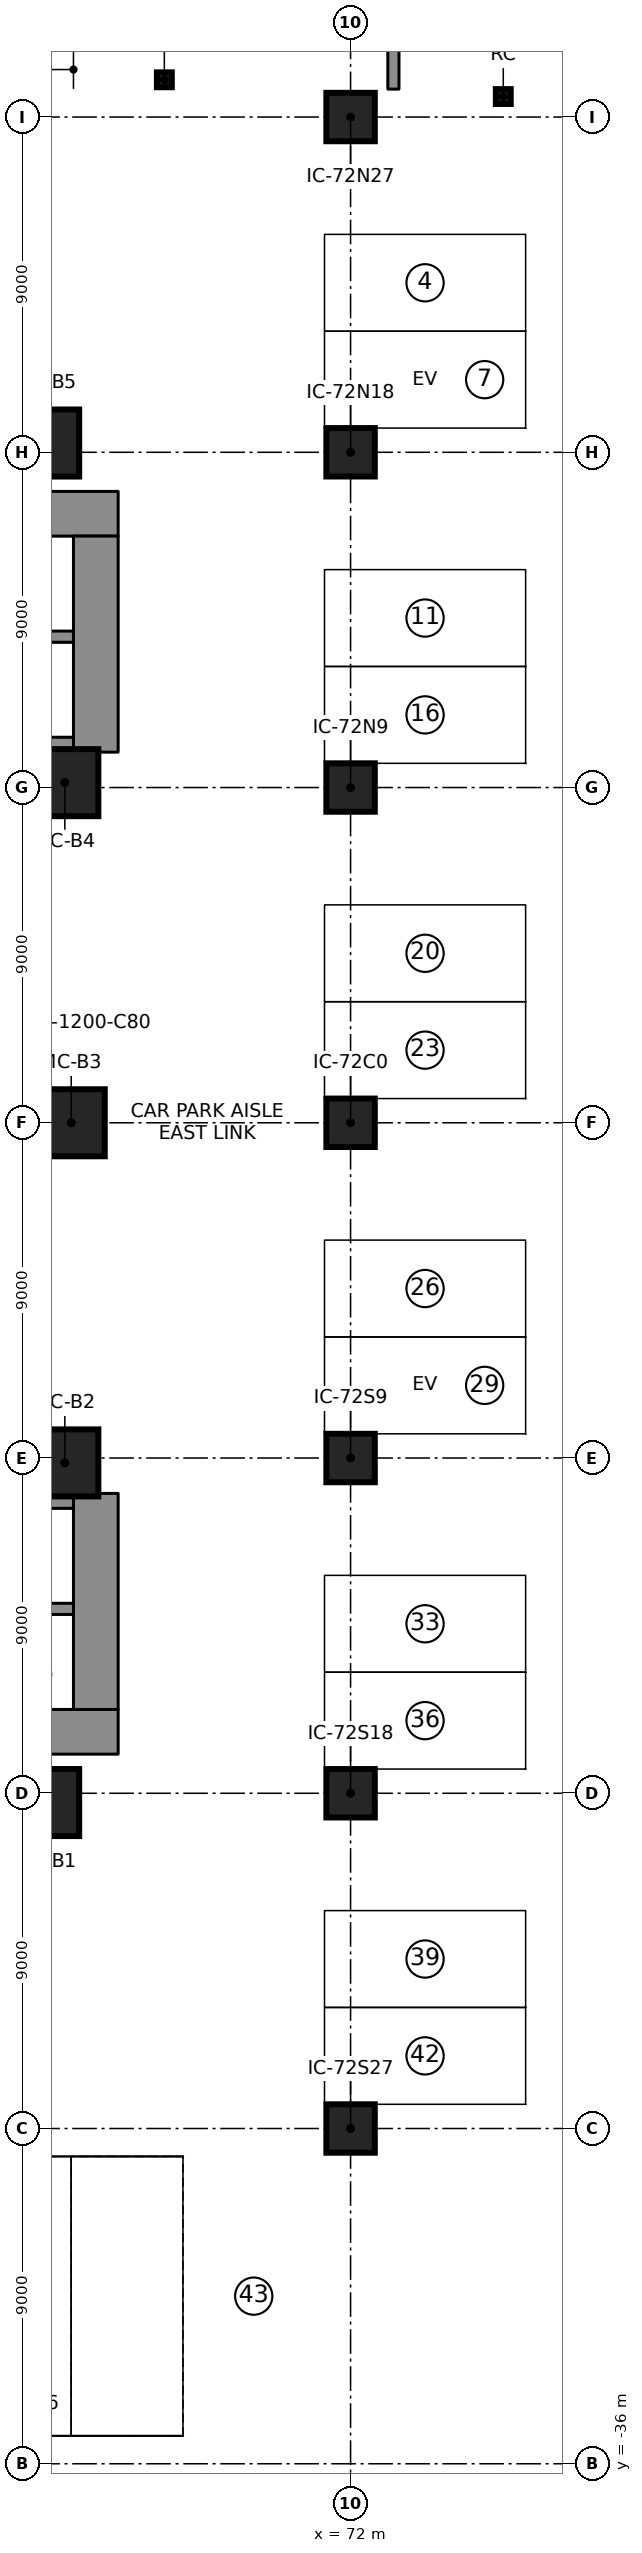
"""IFC4 building model, lengths in metres.
Left out: names, types, materials, properties, quantities, classifications, styles, units other than length and angle.
Written with IfcOpenShell. Run it as: python <this file> out.ifc"""

import sys

from ifc_helpers import new_model, si_unit, direction, frame, frame_2d, origin, origin_2d, place, context, subcontext, project, spatial, rectangle, extrude, element, save


model = new_model("IFC4")
c1 = context("Model", 3, precision=1e-05, world=origin(), true_north=direction((0.0, 1.0)))
c2 = subcontext(c1, "Body", "Model", "MODEL_VIEW")
j1 = project(units=[si_unit("LENGTHUNIT", "METRE"), si_unit("PLANEANGLEUNIT", "RADIAN")], contexts=[c1])
p1 = place(None, origin())
s1 = spatial("IfcSite", under=j1, at=p1, CompositionType="ELEMENT")
p2 = place(p1, origin())
s2 = spatial("IfcBuilding", under=s1, at=p2, CompositionType="ELEMENT")
p3 = place(p2, frame((0.0, 0.0, -10.0)))
s3 = spatial("IfcBuildingStorey", under=s2, at=p3, CompositionType="ELEMENT", Elevation=-10.0)
for number, where, z_axis, x_axis in (
    (1, (50.7, 16.35, -0.3), (0.0, 0.0, 1.0), (1.0, 0.0, 0.0)),
    (2, (50.7, -16.35, -0.3), (0.0, 0.0, 1.0), (1.0, 0.0, 0.0)),
):
    element("IfcWall", number, at=place(p3, frame(where, z_axis=z_axis, x_axis=x_axis)), inside=s3, PredefinedType="SHEAR", context=c2, shape_type="SweptSolid", body=[
        extrude(rectangle(XDim=15.06, YDim=1.2, at=frame_2d((7.53, 0.0))), origin(), (0.0, 0.0, 1.0), 5.3),
    ])
for number, where, z_axis, x_axis in (
    (3, (65.16, 9.95, -0.3), (0.0, 0.0, 1.0), (0.0, 1.0, 0.0)),
    (4, (65.16, -15.75, -0.3), (0.0, 0.0, 1.0), (0.0, 1.0, 0.0)),
):
    element("IfcWall", number, at=place(p3, frame(where, z_axis=z_axis, x_axis=x_axis)), inside=s3, PredefinedType="SHEAR", context=c2, shape_type="SweptSolid", body=[
        extrude(rectangle(XDim=5.8, YDim=1.2, at=frame_2d((2.9, 0.0))), origin(), (0.0, 0.0, 1.0), 5.3),
    ])
p4 = place(p3, frame((50.7, 10.15, -0.3), z_axis=(0.0, 0.0, 1.0), x_axis=(1.0, 0.0, 0.0)))
e5 = element("IfcWall", 5, at=p4, inside=s3, PredefinedType="SHEAR", context=c2, shape_type="SweptSolid", body=[
    extrude(rectangle(XDim=13.86, YDim=0.4, at=frame_2d((6.93, 0.0))), origin(), (0.0, 0.0, 1.0), 5.3),
])
p5 = place(p4, frame((0.7, 0.0, 0.3)))
e6 = element("IfcOpeningElement", 6, at=p5, cuts=e5, PredefinedType="OPENING", context=c2, shape_type="SweptSolid", body=[
    extrude(rectangle(XDim=1.1, YDim=2.1, at=frame_2d((0.55, 1.05))), frame((0.0, 0.21, 0.0), z_axis=(0.0, -1.0, 0.0), x_axis=(1.0, 0.0, 0.0)), (0.0, 0.0, 1.0), 0.42),
])
p6 = place(p4, frame((3.5, 0.0, 0.3)))
e7 = element("IfcOpeningElement", 7, at=p6, cuts=e5, PredefinedType="OPENING", context=c2, shape_type="SweptSolid", body=[
    extrude(rectangle(XDim=1.1, YDim=2.1, at=frame_2d((0.55, 1.05))), frame((0.0, 0.21, 0.0), z_axis=(0.0, -1.0, 0.0), x_axis=(1.0, 0.0, 0.0)), (0.0, 0.0, 1.0), 0.42),
])
p7 = place(p3, frame((50.7, -10.15, -0.3), z_axis=(0.0, 0.0, 1.0), x_axis=(1.0, 0.0, 0.0)))
e8 = element("IfcWall", 8, at=p7, inside=s3, PredefinedType="SHEAR", context=c2, shape_type="SweptSolid", body=[
    extrude(rectangle(XDim=13.86, YDim=0.4, at=frame_2d((6.93, 0.0))), origin(), (0.0, 0.0, 1.0), 5.3),
])
for number, where, z_axis, x_axis in (
    (9, (56.0, 13.05, -0.3), (0.0, 0.0, 1.0), (1.0, 0.0, 0.0)),
    (10, (56.0, -13.05, -0.3), (0.0, 0.0, 1.0), (1.0, 0.0, 0.0)),
):
    element("IfcWall", number, at=place(p3, frame(where, z_axis=z_axis, x_axis=x_axis)), inside=s3, PredefinedType="SHEAR", context=c2, shape_type="SweptSolid", body=[
        extrude(rectangle(XDim=8.56, YDim=0.3, at=frame_2d((4.28, 0.0))), origin(), (0.0, 0.0, 1.0), 5.3),
    ])
for number, where, z_axis, x_axis in (
    (11, (63.813, -18.249, -0.3), (0.0, 0.0, 1.0), (1.0, 0.0, 0.0)),
    (12, (64.328, -9.131, -0.3), (0.0, 0.0, 1.0), (1.0, 0.0, 0.0)),
    (13, (64.5, 0.0, -0.3), (0.0, 0.0, 1.0), (1.0, 0.0, 0.0)),
    (14, (64.328, 9.131, -0.3), (0.0, 0.0, 1.0), (1.0, 0.0, 0.0)),
    (15, (63.813, 18.249, -0.3), (0.0, 0.0, 1.0), (1.0, 0.0, 0.0)),
):
    element("IfcColumn", number, at=place(p3, frame(where, z_axis=z_axis, x_axis=x_axis)), inside=s3, PredefinedType="COLUMN", context=c2, shape_type="SweptSolid", body=[
        extrude(rectangle(XDim=1.8, YDim=1.8, at=origin_2d()), origin(), (0.0, 0.0, 1.0), 5.3),
    ])
for number, where, z_axis, x_axis in (
    (16, (72.0, -27.0, -0.3), (0.0, 0.0, 1.0), (1.0, 0.0, 0.0)),
    (17, (72.0, -18.0, -0.3), (0.0, 0.0, 1.0), (1.0, 0.0, 0.0)),
    (18, (72.0, -9.0, -0.3), (0.0, 0.0, 1.0), (1.0, 0.0, 0.0)),
    (19, (72.0, 0.0, -0.3), (0.0, 0.0, 1.0), (1.0, 0.0, 0.0)),
    (20, (72.0, 9.0, -0.3), (0.0, 0.0, 1.0), (1.0, 0.0, 0.0)),
    (21, (72.0, 18.0, -0.3), (0.0, 0.0, 1.0), (1.0, 0.0, 0.0)),
    (22, (72.0, 27.0, -0.3), (0.0, 0.0, 1.0), (1.0, 0.0, 0.0)),
):
    element("IfcColumn", number, at=place(p3, frame(where, z_axis=z_axis, x_axis=x_axis)), inside=s3, PredefinedType="COLUMN", context=c2, shape_type="SweptSolid", body=[
        extrude(rectangle(XDim=1.3, YDim=1.3, at=origin_2d()), origin(), (0.0, 0.0, 1.0), 5.3),
    ])
p8 = place(p3, frame((67.0, 28.0, -0.3), z_axis=(0.0, 0.0, 1.0), x_axis=(1.0, 0.0, 0.0)))
e23 = element("IfcColumn", 23, at=p8, inside=s3, PredefinedType="COLUMN", context=c2, shape_type="SweptSolid", body=[
    extrude(rectangle(XDim=0.4, YDim=0.4, at=origin_2d()), origin(), (0.0, 0.0, 1.0), 5.3),
])
p9 = place(p3, frame((73.15, 27.75, -0.3), z_axis=(0.0, 0.0, 1.0), x_axis=(0.0, 1.0, 0.0)))
e24 = element("IfcWall", 24, at=p9, inside=s3, PredefinedType="SOLIDWALL", context=c2, shape_type="SweptSolid", body=[
    extrude(rectangle(XDim=7.5, YDim=0.3, at=frame_2d((3.75, 0.0))), origin(), (0.0, 0.0, 1.0), 5.3),
])
p10 = place(p3, frame((76.1, 27.55, -0.3), z_axis=(0.0, 0.0, 1.0), x_axis=(1.0, 0.0, 0.0)))
e25 = element("IfcColumn", 25, at=p10, inside=s3, PredefinedType="COLUMN", context=c2, shape_type="SweptSolid", body=[
    extrude(rectangle(XDim=0.4, YDim=0.4, at=origin_2d()), origin(), (0.0, 0.0, 1.0), 5.3),
])
save(model, sys.argv[1])
